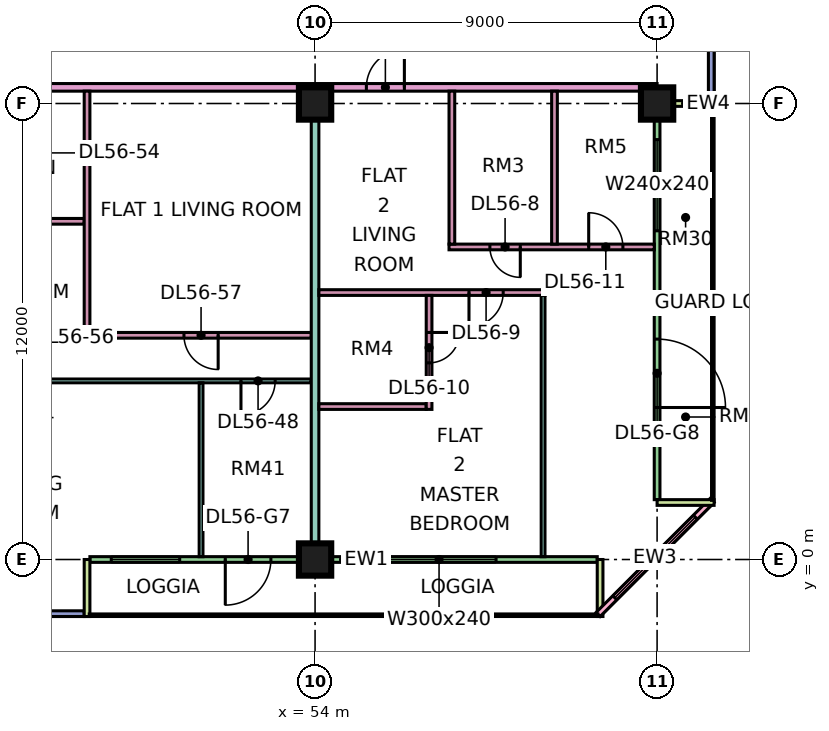
"""IFC4 building model, lengths in metres.
Left out: names, types, materials, properties, quantities, classifications, styles, units other than length and angle.
Written with IfcOpenShell. Run it as: python <this file> out.ifc"""

import sys

from ifc_helpers import new_model, si_unit, direction, frame, frame_2d, origin, origin_2d, place, context, subcontext, project, spatial, rectangle, extrude, element, fill, save


model = new_model("IFC4")
c1 = context("Model", 3, precision=1e-05, world=origin(), true_north=direction((0.0, 1.0)))
c2 = subcontext(c1, "Body", "Model", "MODEL_VIEW")
j1 = project(units=[si_unit("LENGTHUNIT", "METRE"), si_unit("PLANEANGLEUNIT", "RADIAN")], contexts=[c1])
p1 = place(None, origin())
s1 = spatial("IfcSite", under=j1, at=p1, CompositionType="ELEMENT")
p2 = place(p1, origin())
s2 = spatial("IfcBuilding", under=s1, at=p2, CompositionType="ELEMENT")
p3 = place(p2, frame((0.0, 0.0, 237.9)))
s3 = spatial("IfcBuildingStorey", under=s2, at=p3, CompositionType="ELEMENT", Elevation=237.9)
for number, where, z_axis, x_axis in (
    (1, (54.0, 0.0, 0.0), (0.0, 0.0, 1.0), (1.0, 0.0, 0.0)),
    (2, (54.0, 12.0, 0.0), (0.0, 0.0, 1.0), (1.0, 0.0, 0.0)),
    (3, (63.0, 12.0, 0.0), (0.0, 0.0, 1.0), (1.0, 0.0, 0.0)),
):
    element("IfcColumn", number, at=place(p3, frame(where, z_axis=z_axis, x_axis=x_axis)), inside=s3, PredefinedType="COLUMN", context=c2, shape_type="SweptSolid", body=[
        extrude(rectangle(XDim=0.85, YDim=0.85, at=origin_2d()), origin(), (0.0, 0.0, 1.0), 3.75),
    ])
p4 = place(p3, frame((36.075, -1.425, 0.0), z_axis=(0.0, 0.0, 1.0), x_axis=(1.0, 0.0, 0.0)))
e4 = element("IfcWall", 4, at=p4, inside=s3, PredefinedType="SOLIDWALL", context=c2, shape_type="SweptSolid", body=[
    extrude(rectangle(XDim=11.85, YDim=0.15, at=frame_2d((5.925, 0.0))), origin(), (0.0, 0.0, 1.0), 3.35),
])
p5 = place(p4, frame((0.562, 0.0, 0.45)))
e5 = element("IfcOpeningElement", 5, at=p5, cuts=e4, PredefinedType="OPENING", context=c2, shape_type="SweptSolid", body=[
    extrude(rectangle(XDim=1.8, YDim=2.4, at=frame_2d((0.9, 1.2))), frame((0.0, 0.085, 0.0), z_axis=(0.0, -1.0, 0.0), x_axis=(1.0, 0.0, 0.0)), (0.0, 0.0, 1.0), 0.17),
])
p6 = place(p4, frame((3.525, 0.0, 0.45)))
e6 = element("IfcOpeningElement", 6, at=p6, cuts=e4, PredefinedType="OPENING", context=c2, shape_type="SweptSolid", body=[
    extrude(rectangle(XDim=1.8, YDim=2.4, at=frame_2d((0.9, 1.2))), frame((0.0, 0.085, 0.0), z_axis=(0.0, -1.0, 0.0), x_axis=(1.0, 0.0, 0.0)), (0.0, 0.0, 1.0), 0.17),
])
p7 = place(p4, frame((7.387, 0.0, 0.45)))
e7 = element("IfcOpeningElement", 7, at=p7, cuts=e4, PredefinedType="OPENING", context=c2, shape_type="SweptSolid", body=[
    extrude(rectangle(XDim=3.0, YDim=2.4, at=frame_2d((1.5, 1.2))), frame((0.0, 0.085, 0.0), z_axis=(0.0, -1.0, 0.0), x_axis=(1.0, 0.0, 0.0)), (0.0, 0.0, 1.0), 0.17),
])
p8 = place(p3, frame((48.075, 0.0, 0.0), z_axis=(0.0, 0.0, 1.0), x_axis=(1.0, 0.0, 0.0)))
e8 = element("IfcWall", 8, at=p8, inside=s3, PredefinedType="SOLIDWALL", context=c2, shape_type="SweptSolid", body=[
    extrude(rectangle(XDim=13.35, YDim=0.15, at=frame_2d((6.675, 0.0))), origin(), (0.0, 0.0, 1.0), 3.35),
])
p9 = place(p8, frame((0.562, 0.0, 0.45)))
e9 = element("IfcOpeningElement", 9, at=p9, cuts=e8, PredefinedType="OPENING", context=c2, shape_type="SweptSolid", body=[
    extrude(rectangle(XDim=1.8, YDim=2.4, at=frame_2d((0.9, 1.2))), frame((0.0, 0.085, 0.0), z_axis=(0.0, -1.0, 0.0), x_axis=(1.0, 0.0, 0.0)), (0.0, 0.0, 1.0), 0.17),
])
p10 = place(p8, frame((3.562, 0.0, 0.0)))
e10 = element("IfcOpeningElement", 10, at=p10, cuts=e8, PredefinedType="OPENING", context=c2, shape_type="SweptSolid", body=[
    extrude(rectangle(XDim=1.2, YDim=2.4, at=frame_2d((0.6, 1.2))), frame((0.0, 0.085, 0.0), z_axis=(0.0, -1.0, 0.0), x_axis=(1.0, 0.0, 0.0)), (0.0, 0.0, 1.0), 0.17),
])
p11 = place(p8, frame((7.688, 0.0, 0.45)))
e11 = element("IfcOpeningElement", 11, at=p11, cuts=e8, PredefinedType="OPENING", context=c2, shape_type="SweptSolid", body=[
    extrude(rectangle(XDim=3.0, YDim=2.4, at=frame_2d((1.5, 1.2))), frame((0.0, 0.085, 0.0), z_axis=(0.0, -1.0, 0.0), x_axis=(1.0, 0.0, 0.0)), (0.0, 0.0, 1.0), 0.17),
])
for number, where, z_axis, x_axis in (
    (12, (48.0, -1.5, 0.0), (0.0, 0.0, 1.0), (0.0, 1.0, 0.0)),
    (13, (61.5, -1.5, 0.0), (0.0, 0.0, 1.0), (0.0, 1.0, 0.0)),
):
    element("IfcWall", number, at=place(p3, frame(where, z_axis=z_axis, x_axis=x_axis)), inside=s3, PredefinedType="SOLIDWALL", context=c2, shape_type="SweptSolid", body=[
        extrude(rectangle(XDim=1.5, YDim=0.15, at=frame_2d((0.75, 0.0))), origin(), (0.0, 0.0, 1.0), 3.35),
    ])
p12 = place(p3, frame((61.447, -1.447, 0.0), z_axis=(0.0, 0.0, 1.0), x_axis=(0.707106781187, 0.707106781187, 0.0)))
e14 = element("IfcWall", 14, at=p12, inside=s3, PredefinedType="SOLIDWALL", context=c2, shape_type="SweptSolid", body=[
    extrude(rectangle(XDim=4.243, YDim=0.15, at=frame_2d((2.121, 0.0))), origin(), (0.0, 0.0, 1.0), 3.35),
])
p13 = place(p12, frame((0.621, 0.0, 0.45)))
e15 = element("IfcOpeningElement", 15, at=p13, cuts=e14, PredefinedType="OPENING", context=c2, shape_type="SweptSolid", body=[
    extrude(rectangle(XDim=3.0, YDim=2.4, at=frame_2d((1.5, 1.2))), frame((0.0, 0.085, 0.0), z_axis=(0.0, -1.0, 0.0), x_axis=(1.0, 0.0, 0.0)), (0.0, 0.0, 1.0), 0.17),
])
p14 = place(p3, frame((63.0, 1.575, 0.0), z_axis=(0.0, 0.0, 1.0), x_axis=(0.0, 1.0, 0.0)))
e16 = element("IfcWall", 16, at=p14, inside=s3, PredefinedType="SOLIDWALL", context=c2, shape_type="SweptSolid", body=[
    extrude(rectangle(XDim=10.35, YDim=0.15, at=frame_2d((5.175, 0.0))), origin(), (0.0, 0.0, 1.0), 3.35),
])
p15 = place(p14, frame((2.425, 0.0, 0.0)))
e17 = element("IfcOpeningElement", 17, at=p15, cuts=e16, PredefinedType="OPENING", context=c2, shape_type="SweptSolid", body=[
    extrude(rectangle(XDim=1.8, YDim=2.4, at=frame_2d((0.9, 1.2))), frame((0.0, 0.085, 0.0), z_axis=(0.0, -1.0, 0.0), x_axis=(1.0, 0.0, 0.0)), (0.0, 0.0, 1.0), 0.17),
])
p16 = place(p14, frame((7.075, 0.0, 0.45)))
e18 = element("IfcOpeningElement", 18, at=p16, cuts=e16, PredefinedType="OPENING", context=c2, shape_type="SweptSolid", body=[
    extrude(rectangle(XDim=2.4, YDim=2.4, at=frame_2d((1.2, 1.2))), frame((0.0, 0.085, 0.0), z_axis=(0.0, -1.0, 0.0), x_axis=(1.0, 0.0, 0.0)), (0.0, 0.0, 1.0), 0.17),
])
for number, where, z_axis, x_axis in (
    (19, (64.5, 1.5, 0.0), (0.0, 0.0, 1.0), (-1.0, 0.0, 0.0)),
    (20, (64.5, 12.0, 0.0), (0.0, 0.0, 1.0), (-1.0, 0.0, 0.0)),
):
    element("IfcWall", number, at=place(p3, frame(where, z_axis=z_axis, x_axis=x_axis)), inside=s3, PredefinedType="SOLIDWALL", context=c2, shape_type="SweptSolid", body=[
        extrude(rectangle(XDim=1.5, YDim=0.15, at=frame_2d((0.75, 0.0))), origin(), (0.0, 0.0, 1.0), 3.35),
    ])
p17 = place(p3, frame((64.425, 12.075, 0.0), z_axis=(0.0, 0.0, 1.0), x_axis=(0.0, 1.0, 0.0)))
e21 = element("IfcWall", 21, at=p17, inside=s3, PredefinedType="SOLIDWALL", context=c2, shape_type="SweptSolid", body=[
    extrude(rectangle(XDim=10.425, YDim=0.15, at=frame_2d((5.212, 0.0))), origin(), (0.0, 0.0, 1.0), 3.35),
])
p18 = place(p17, frame((5.475, 0.0, 0.45)))
e22 = element("IfcOpeningElement", 22, at=p18, cuts=e21, PredefinedType="OPENING", context=c2, shape_type="SweptSolid", body=[
    extrude(rectangle(XDim=3.0, YDim=2.4, at=frame_2d((1.5, 1.2))), frame((0.0, 0.085, 0.0), z_axis=(0.0, -1.0, 0.0), x_axis=(1.0, 0.0, 0.0)), (0.0, 0.0, 1.0), 0.17),
])
p19 = place(p3, frame((33.05, 4.7, 0.0), z_axis=(0.0, 0.0, 1.0), x_axis=(1.0, 0.0, 0.0)))
e23 = element("IfcWall", 23, at=p19, inside=s3, PredefinedType="PARTITIONING", context=c2, shape_type="SweptSolid", body=[
    extrude(rectangle(XDim=20.85, YDim=0.1, at=frame_2d((10.425, 0.0))), origin(), (0.0, 0.0, 1.0), 3.35),
])
p20 = place(p19, frame((1.0, 0.0, 0.0)))
e24 = element("IfcOpeningElement", 24, at=p20, cuts=e23, PredefinedType="OPENING", context=c2, shape_type="SweptSolid", body=[
    extrude(rectangle(XDim=0.9, YDim=2.1, at=frame_2d((0.45, 1.05))), frame((0.0, 0.06, 0.0), z_axis=(0.0, -1.0, 0.0), x_axis=(1.0, 0.0, 0.0)), (0.0, 0.0, 1.0), 0.12),
])
p21 = place(p19, frame((4.0, 0.0, 0.0)))
e25 = element("IfcOpeningElement", 25, at=p21, cuts=e23, PredefinedType="OPENING", context=c2, shape_type="SweptSolid", body=[
    extrude(rectangle(XDim=0.9, YDim=2.1, at=frame_2d((0.45, 1.05))), frame((0.0, 0.06, 0.0), z_axis=(0.0, -1.0, 0.0), x_axis=(1.0, 0.0, 0.0)), (0.0, 0.0, 1.0), 0.12),
])
p22 = place(p19, frame((7.0, 0.0, 0.0)))
e26 = element("IfcOpeningElement", 26, at=p22, cuts=e23, PredefinedType="OPENING", context=c2, shape_type="SweptSolid", body=[
    extrude(rectangle(XDim=0.9, YDim=2.1, at=frame_2d((0.45, 1.05))), frame((0.0, 0.06, 0.0), z_axis=(0.0, -1.0, 0.0), x_axis=(1.0, 0.0, 0.0)), (0.0, 0.0, 1.0), 0.12),
])
p23 = place(p19, frame((19.0, 0.0, 0.0)))
e27 = element("IfcOpeningElement", 27, at=p23, cuts=e23, PredefinedType="OPENING", context=c2, shape_type="SweptSolid", body=[
    extrude(rectangle(XDim=0.9, YDim=2.1, at=frame_2d((0.45, 1.05))), frame((0.0, 0.06, 0.0), z_axis=(0.0, -1.0, 0.0), x_axis=(1.0, 0.0, 0.0)), (0.0, 0.0, 1.0), 0.12),
])
p24 = place(p19, frame((13.0, 0.0, 0.0)))
e28 = element("IfcOpeningElement", 28, at=p24, cuts=e23, PredefinedType="OPENING", context=c2, shape_type="SweptSolid", body=[
    extrude(rectangle(XDim=0.9, YDim=2.1, at=frame_2d((0.45, 1.05))), frame((0.0, 0.06, 0.0), z_axis=(0.0, -1.0, 0.0), x_axis=(1.0, 0.0, 0.0)), (0.0, 0.0, 1.0), 0.12),
])
p25 = place(p3, frame((40.65, 12.425, 0.0), z_axis=(0.0, 0.0, 1.0), x_axis=(1.0, 0.0, 0.0)))
e29 = element("IfcWall", 29, at=p25, inside=s3, PredefinedType="PARTITIONING", context=c2, shape_type="SweptSolid", body=[
    extrude(rectangle(XDim=22.35, YDim=0.2, at=frame_2d((11.175, 0.0))), origin(), (0.0, 0.0, 1.0), 3.35),
])
p26 = place(p25, frame((14.7, 0.0, 0.0)))
e30 = element("IfcOpeningElement", 30, at=p26, cuts=e29, PredefinedType="OPENING", context=c2, shape_type="SweptSolid", body=[
    extrude(rectangle(XDim=1.0, YDim=2.1, at=frame_2d((0.5, 1.05))), frame((0.0, 0.11, 0.0), z_axis=(0.0, -1.0, 0.0), x_axis=(1.0, 0.0, 0.0)), (0.0, 0.0, 1.0), 0.22),
])
p27 = place(p25, frame((1.05, 0.0, 0.0)))
e31 = element("IfcOpeningElement", 31, at=p27, cuts=e29, PredefinedType="OPENING", context=c2, shape_type="SweptSolid", body=[
    extrude(rectangle(XDim=1.0, YDim=2.1, at=frame_2d((0.5, 1.05))), frame((0.0, 0.11, 0.0), z_axis=(0.0, -1.0, 0.0), x_axis=(1.0, 0.0, 0.0)), (0.0, 0.0, 1.0), 0.22),
])
p28 = place(p3, frame((43.575, 5.9, 0.0), z_axis=(0.0, 0.0, 1.0), x_axis=(1.0, 0.0, 0.0)))
e32 = element("IfcWall", 32, at=p28, inside=s3, PredefinedType="PARTITIONING", context=c2, shape_type="SweptSolid", body=[
    extrude(rectangle(XDim=10.325, YDim=0.15, at=frame_2d((5.163, 0.0))), origin(), (0.0, 0.0, 1.0), 3.35),
])
p29 = place(p28, frame((1.825, 0.0, 0.0)))
e33 = element("IfcOpeningElement", 33, at=p29, cuts=e32, PredefinedType="OPENING", context=c2, shape_type="SweptSolid", body=[
    extrude(rectangle(XDim=0.8, YDim=2.1, at=frame_2d((0.4, 1.05))), frame((0.0, 0.085, 0.0), z_axis=(0.0, -1.0, 0.0), x_axis=(1.0, 0.0, 0.0)), (0.0, 0.0, 1.0), 0.17),
])
p30 = place(p28, frame((6.975, 0.0, 0.0)))
e34 = element("IfcOpeningElement", 34, at=p30, cuts=e32, PredefinedType="OPENING", context=c2, shape_type="SweptSolid", body=[
    extrude(rectangle(XDim=0.9, YDim=2.1, at=frame_2d((0.45, 1.05))), frame((0.0, 0.085, 0.0), z_axis=(0.0, -1.0, 0.0), x_axis=(1.0, 0.0, 0.0)), (0.0, 0.0, 1.0), 0.17),
])
p31 = place(p3, frame((43.725, 8.9, 0.0), z_axis=(0.0, 0.0, 1.0), x_axis=(1.0, 0.0, 0.0)))
e35 = element("IfcWall", 35, at=p31, inside=s3, PredefinedType="PARTITIONING", context=c2, shape_type="SweptSolid", body=[
    extrude(rectangle(XDim=4.2, YDim=0.15, at=frame_2d((2.1, 0.0))), origin(), (0.0, 0.0, 1.0), 3.35),
])
p32 = place(p3, frame((48.0, 5.975, 0.0), z_axis=(0.0, 0.0, 1.0), x_axis=(0.0, 1.0, 0.0)))
e36 = element("IfcWall", 36, at=p32, inside=s3, PredefinedType="PARTITIONING", context=c2, shape_type="SweptSolid", body=[
    extrude(rectangle(XDim=6.35, YDim=0.15, at=frame_2d((3.175, 0.0))), origin(), (0.0, 0.0, 1.0), 3.35),
])
p33 = place(p3, frame((51.0, 0.074, 0.0), z_axis=(0.0, 0.0, 1.0), x_axis=(0.0, 1.0, 0.0)))
e37 = element("IfcWall", 37, at=p33, inside=s3, PredefinedType="PARTITIONING", context=c2, shape_type="SweptSolid", body=[
    extrude(rectangle(XDim=4.576, YDim=0.1, at=frame_2d((2.288, 0.0))), origin(), (0.0, 0.0, 1.0), 3.35),
])
p34 = place(p3, frame((54.0, 0.074, 0.0), z_axis=(0.0, 0.0, 1.0), x_axis=(0.0, 1.0, 0.0)))
e38 = element("IfcWall", 38, at=p34, inside=s3, PredefinedType="PARTITIONING", context=c2, shape_type="SweptSolid", body=[
    extrude(rectangle(XDim=12.251, YDim=0.2, at=frame_2d((6.125, 0.0))), origin(), (0.0, 0.0, 1.0), 3.35),
])
p35 = place(p3, frame((54.1, 4.025, 0.0), z_axis=(0.0, 0.0, 1.0), x_axis=(1.0, 0.0, 0.0)))
e39 = element("IfcWall", 39, at=p35, inside=s3, PredefinedType="PARTITIONING", context=c2, shape_type="SweptSolid", body=[
    extrude(rectangle(XDim=2.825, YDim=0.15, at=frame_2d((1.413, 0.0))), origin(), (0.0, 0.0, 1.0), 3.35),
])
p36 = place(p3, frame((54.1, 7.025, 0.0), z_axis=(0.0, 0.0, 1.0), x_axis=(1.0, 0.0, 0.0)))
e40 = element("IfcWall", 40, at=p36, inside=s3, PredefinedType="PARTITIONING", context=c2, shape_type="SweptSolid", body=[
    extrude(rectangle(XDim=5.95, YDim=0.15, at=frame_2d((2.975, 0.0))), origin(), (0.0, 0.0, 1.0), 3.35),
])
p37 = place(p36, frame((3.95, 0.0, 0.0)))
e41 = element("IfcOpeningElement", 41, at=p37, cuts=e40, PredefinedType="OPENING", context=c2, shape_type="SweptSolid", body=[
    extrude(rectangle(XDim=0.9, YDim=2.1, at=frame_2d((0.45, 1.05))), frame((0.0, 0.085, 0.0), z_axis=(0.0, -1.0, 0.0), x_axis=(1.0, 0.0, 0.0)), (0.0, 0.0, 1.0), 0.17),
])
p38 = place(p3, frame((57.0, 3.95, 0.0), z_axis=(0.0, 0.0, 1.0), x_axis=(0.0, 1.0, 0.0)))
e42 = element("IfcWall", 42, at=p38, inside=s3, PredefinedType="PARTITIONING", context=c2, shape_type="SweptSolid", body=[
    extrude(rectangle(XDim=3.0, YDim=0.15, at=frame_2d((1.5, 0.0))), origin(), (0.0, 0.0, 1.0), 3.35),
])
p39 = place(p38, frame((1.225, 0.0, 0.0)))
e43 = element("IfcOpeningElement", 43, at=p39, cuts=e42, PredefinedType="OPENING", context=c2, shape_type="SweptSolid", body=[
    extrude(rectangle(XDim=0.8, YDim=2.1, at=frame_2d((0.4, 1.05))), frame((0.0, 0.085, 0.0), z_axis=(0.0, -1.0, 0.0), x_axis=(1.0, 0.0, 0.0)), (0.0, 0.0, 1.0), 0.17),
])
p40 = place(p3, frame((57.525, 8.225, 0.0), z_axis=(0.0, 0.0, 1.0), x_axis=(1.0, 0.0, 0.0)))
e44 = element("IfcWall", 44, at=p40, inside=s3, PredefinedType="PARTITIONING", context=c2, shape_type="SweptSolid", body=[
    extrude(rectangle(XDim=5.401, YDim=0.15, at=frame_2d((2.701, 0.0))), origin(), (0.0, 0.0, 1.0), 3.35),
])
p41 = place(p40, frame((1.075, 0.0, 0.0)))
e45 = element("IfcOpeningElement", 45, at=p41, cuts=e44, PredefinedType="OPENING", context=c2, shape_type="SweptSolid", body=[
    extrude(rectangle(XDim=0.8, YDim=2.1, at=frame_2d((0.4, 1.05))), frame((0.0, 0.085, 0.0), z_axis=(0.0, -1.0, 0.0), x_axis=(1.0, 0.0, 0.0)), (0.0, 0.0, 1.0), 0.17),
])
p42 = place(p40, frame((3.675, 0.0, 0.0)))
e46 = element("IfcOpeningElement", 46, at=p42, cuts=e44, PredefinedType="OPENING", context=c2, shape_type="SweptSolid", body=[
    extrude(rectangle(XDim=0.9, YDim=2.1, at=frame_2d((0.45, 1.05))), frame((0.0, 0.085, 0.0), z_axis=(0.0, -1.0, 0.0), x_axis=(1.0, 0.0, 0.0)), (0.0, 0.0, 1.0), 0.17),
])
p43 = place(p3, frame((57.6, 8.3, 0.0), z_axis=(0.0, 0.0, 1.0), x_axis=(0.0, 1.0, 0.0)))
e47 = element("IfcWall", 47, at=p43, inside=s3, PredefinedType="PARTITIONING", context=c2, shape_type="SweptSolid", body=[
    extrude(rectangle(XDim=4.025, YDim=0.15, at=frame_2d((2.012, 0.0))), origin(), (0.0, 0.0, 1.0), 3.35),
])
p44 = place(p3, frame((60.0, 0.074, 0.0), z_axis=(0.0, 0.0, 1.0), x_axis=(0.0, 1.0, 0.0)))
e48 = element("IfcWall", 48, at=p44, inside=s3, PredefinedType="PARTITIONING", context=c2, shape_type="SweptSolid", body=[
    extrude(rectangle(XDim=6.876, YDim=0.1, at=frame_2d((3.438, 0.0))), origin(), (0.0, 0.0, 1.0), 3.35),
])
p45 = place(p3, frame((60.3, 8.3, 0.0), z_axis=(0.0, 0.0, 1.0), x_axis=(0.0, 1.0, 0.0)))
e49 = element("IfcWall", 49, at=p45, inside=s3, PredefinedType="PARTITIONING", context=c2, shape_type="SweptSolid", body=[
    extrude(rectangle(XDim=4.025, YDim=0.15, at=frame_2d((2.012, 0.0))), origin(), (0.0, 0.0, 1.0), 3.35),
])
p46 = place(p9, origin())
e50 = element("IfcWindow", 50, at=p46, inside=s3, PartitioningType="SINGLE_PANEL", PredefinedType="WINDOW", context=c2, shape_type="SweptSolid", body=[
    extrude(rectangle(XDim=1.8, YDim=2.4, at=frame_2d((0.9, 1.2))), frame((0.0, 0.03, 0.0), z_axis=(0.0, -1.0, 0.0), x_axis=(1.0, 0.0, 0.0)), (0.0, 0.0, 1.0), 0.06),
])
fill(e9, e50)
p47 = place(p10, frame((1.2, 0.0, 0.0), z_axis=(0.0, 0.0, 1.0), x_axis=(-1.0, 0.0, 0.0)))
e51 = element("IfcDoor", 51, at=p47, inside=s3, OperationType="DOUBLE_DOOR_SINGLE_SWING", PredefinedType="DOOR", context=c2, shape_type="SweptSolid", body=[
    extrude(rectangle(XDim=1.2, YDim=2.4, at=frame_2d((0.6, 1.2))), frame((0.0, 0.025, 0.0), z_axis=(0.0, -1.0, 0.0), x_axis=(1.0, 0.0, 0.0)), (0.0, 0.0, 1.0), 0.05),
])
fill(e10, e51)
p48 = place(p11, origin())
e52 = element("IfcWindow", 52, at=p48, inside=s3, PartitioningType="SINGLE_PANEL", PredefinedType="WINDOW", context=c2, shape_type="SweptSolid", body=[
    extrude(rectangle(XDim=3.0, YDim=2.4, at=frame_2d((1.5, 1.2))), frame((0.0, 0.03, 0.0), z_axis=(0.0, -1.0, 0.0), x_axis=(1.0, 0.0, 0.0)), (0.0, 0.0, 1.0), 0.06),
])
fill(e11, e52)
p49 = place(p13, origin())
e53 = element("IfcWindow", 53, at=p49, inside=s3, PartitioningType="SINGLE_PANEL", PredefinedType="WINDOW", context=c2, shape_type="SweptSolid", body=[
    extrude(rectangle(XDim=3.0, YDim=2.4, at=frame_2d((1.5, 1.2))), frame((0.0, 0.03, 0.0), z_axis=(0.0, -1.0, 0.0), x_axis=(1.0, 0.0, 0.0)), (0.0, 0.0, 1.0), 0.06),
])
fill(e15, e53)
p50 = place(p15, frame((1.8, 0.0, 0.0), z_axis=(0.0, 0.0, 1.0), x_axis=(-1.0, 0.0, 0.0)))
e54 = element("IfcDoor", 54, at=p50, inside=s3, OperationType="DOUBLE_DOOR_SINGLE_SWING", PredefinedType="DOOR", context=c2, shape_type="SweptSolid", body=[
    extrude(rectangle(XDim=1.8, YDim=2.4, at=frame_2d((0.9, 1.2))), frame((0.0, 0.025, 0.0), z_axis=(0.0, -1.0, 0.0), x_axis=(1.0, 0.0, 0.0)), (0.0, 0.0, 1.0), 0.05),
])
fill(e17, e54)
p51 = place(p16, origin())
e55 = element("IfcWindow", 55, at=p51, inside=s3, PartitioningType="SINGLE_PANEL", PredefinedType="WINDOW", context=c2, shape_type="SweptSolid", body=[
    extrude(rectangle(XDim=2.4, YDim=2.4, at=frame_2d((1.2, 1.2))), frame((0.0, 0.03, 0.0), z_axis=(0.0, -1.0, 0.0), x_axis=(1.0, 0.0, 0.0)), (0.0, 0.0, 1.0), 0.06),
])
fill(e18, e55)
p52 = place(p41, origin())
e56 = element("IfcDoor", 56, at=p52, inside=s3, OperationType="SINGLE_SWING_RIGHT", PredefinedType="DOOR", context=c2, shape_type="SweptSolid", body=[
    extrude(rectangle(XDim=0.8, YDim=2.1, at=frame_2d((0.4, 1.05))), frame((0.0, 0.025, 0.0), z_axis=(0.0, -1.0, 0.0), x_axis=(1.0, 0.0, 0.0)), (0.0, 0.0, 1.0), 0.05),
])
fill(e45, e56)
p53 = place(p37, frame((0.9, 0.0, 0.0), z_axis=(0.0, 0.0, 1.0), x_axis=(-1.0, 0.0, 0.0)))
e57 = element("IfcDoor", 57, at=p53, inside=s3, OperationType="SINGLE_SWING_LEFT", PredefinedType="DOOR", context=c2, shape_type="SweptSolid", body=[
    extrude(rectangle(XDim=0.9, YDim=2.1, at=frame_2d((0.45, 1.05))), frame((0.0, 0.025, 0.0), z_axis=(0.0, -1.0, 0.0), x_axis=(1.0, 0.0, 0.0)), (0.0, 0.0, 1.0), 0.05),
])
fill(e41, e57)
p54 = place(p39, origin())
e58 = element("IfcDoor", 58, at=p54, inside=s3, OperationType="SINGLE_SWING_RIGHT", PredefinedType="DOOR", context=c2, shape_type="SweptSolid", body=[
    extrude(rectangle(XDim=0.8, YDim=2.1, at=frame_2d((0.4, 1.05))), frame((0.0, 0.025, 0.0), z_axis=(0.0, -1.0, 0.0), x_axis=(1.0, 0.0, 0.0)), (0.0, 0.0, 1.0), 0.05),
])
fill(e43, e58)
p55 = place(p42, origin())
e59 = element("IfcDoor", 59, at=p55, inside=s3, OperationType="SINGLE_SWING_LEFT", PredefinedType="DOOR", context=c2, shape_type="SweptSolid", body=[
    extrude(rectangle(XDim=0.9, YDim=2.1, at=frame_2d((0.45, 1.05))), frame((0.0, 0.025, 0.0), z_axis=(0.0, -1.0, 0.0), x_axis=(1.0, 0.0, 0.0)), (0.0, 0.0, 1.0), 0.05),
])
fill(e46, e59)
p56 = place(p26, frame((1.0, 0.0, 0.0), z_axis=(0.0, 0.0, 1.0), x_axis=(-1.0, 0.0, 0.0)))
e60 = element("IfcDoor", 60, at=p56, inside=s3, OperationType="SINGLE_SWING_RIGHT", PredefinedType="DOOR", context=c2, shape_type="SweptSolid", body=[
    extrude(rectangle(XDim=1.0, YDim=2.1, at=frame_2d((0.5, 1.05))), frame((0.0, 0.025, 0.0), z_axis=(0.0, -1.0, 0.0), x_axis=(1.0, 0.0, 0.0)), (0.0, 0.0, 1.0), 0.05),
])
fill(e30, e60)
p57 = place(p23, frame((0.9, 0.0, 0.0), z_axis=(0.0, 0.0, 1.0), x_axis=(-1.0, 0.0, 0.0)))
e61 = element("IfcDoor", 61, at=p57, inside=s3, OperationType="SINGLE_SWING_LEFT", PredefinedType="DOOR", context=c2, shape_type="SweptSolid", body=[
    extrude(rectangle(XDim=0.9, YDim=2.1, at=frame_2d((0.45, 1.05))), frame((0.0, 0.025, 0.0), z_axis=(0.0, -1.0, 0.0), x_axis=(1.0, 0.0, 0.0)), (0.0, 0.0, 1.0), 0.05),
])
fill(e27, e61)
p58 = place(p30, origin())
e62 = element("IfcDoor", 62, at=p58, inside=s3, OperationType="SINGLE_SWING_RIGHT", PredefinedType="DOOR", context=c2, shape_type="SweptSolid", body=[
    extrude(rectangle(XDim=0.9, YDim=2.1, at=frame_2d((0.45, 1.05))), frame((0.0, 0.025, 0.0), z_axis=(0.0, -1.0, 0.0), x_axis=(1.0, 0.0, 0.0)), (0.0, 0.0, 1.0), 0.05),
])
fill(e34, e62)
save(model, sys.argv[1])
